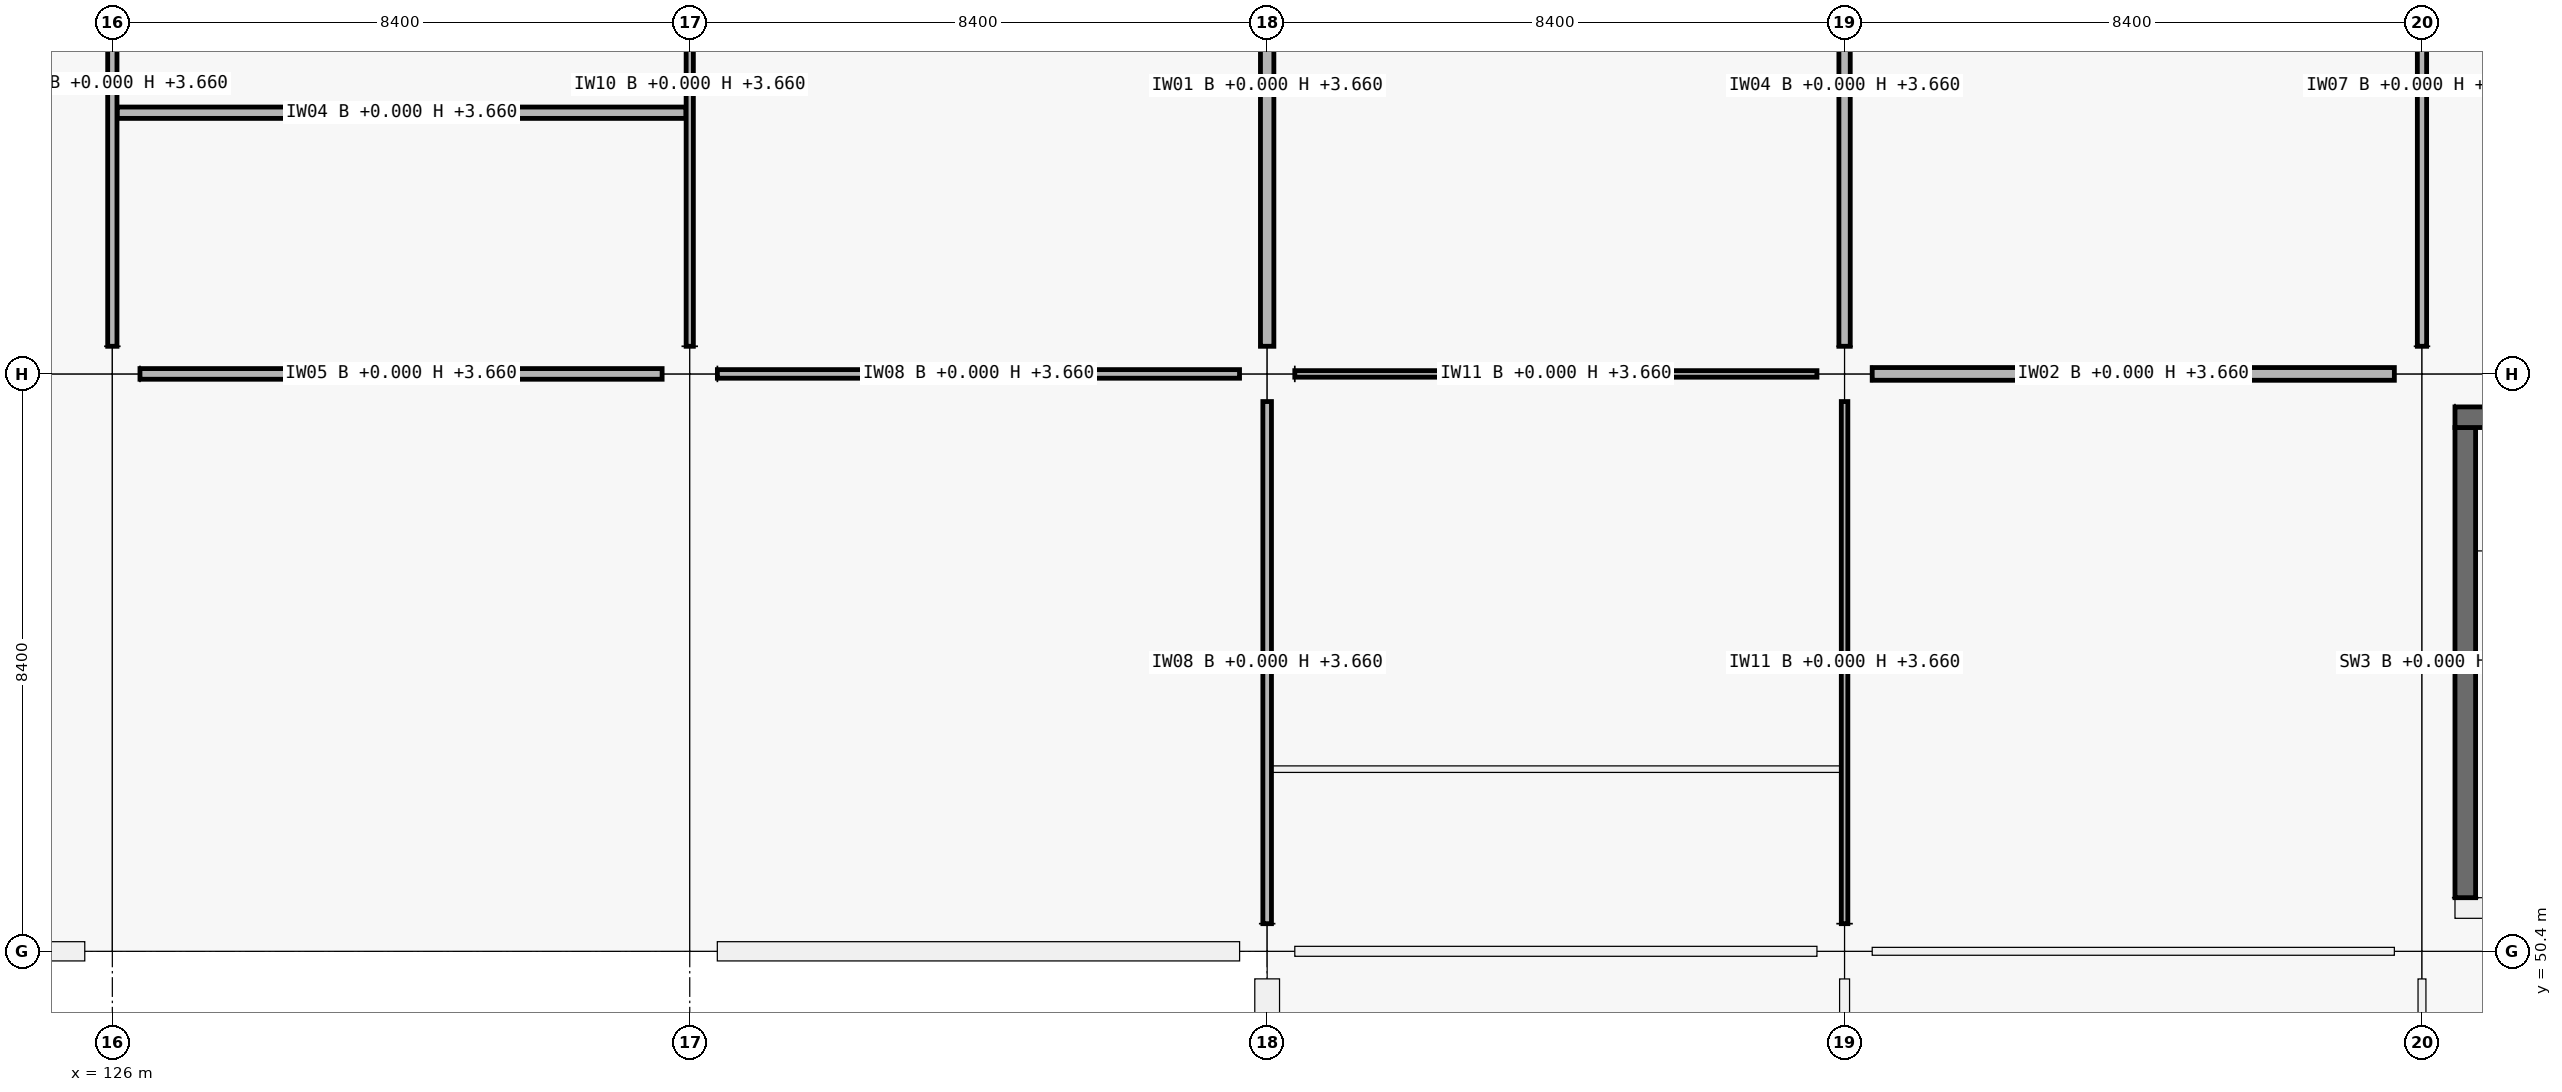
"""IFC4 building model, lengths in metres.
Left out: names, types, materials, properties, quantities, classifications, styles, units other than length and angle.
Written with IfcOpenShell. Run it as: python <this file> out.ifc"""

import sys

from ifc_helpers import new_model, si_unit, direction, frame, frame_2d, origin, origin_2d, place, context, subcontext, project, spatial, rectangle, extrude, element, fill, save


model = new_model("IFC4")
c1 = context("Model", 3, precision=1e-05, world=origin(), true_north=direction((0.0, 1.0)))
c2 = subcontext(c1, "Body", "Model", "MODEL_VIEW")
j1 = project(units=[si_unit("LENGTHUNIT", "METRE"), si_unit("PLANEANGLEUNIT", "RADIAN")], contexts=[c1])
p1 = place(None, origin())
s1 = spatial("IfcSite", under=j1, at=p1, CompositionType="ELEMENT")
p2 = place(p1, origin())
s2 = spatial("IfcBuilding", under=s1, at=p2, CompositionType="ELEMENT")
p3 = place(p2, origin())
s3 = spatial("IfcBuildingStorey", under=s2, at=p3, CompositionType="ELEMENT", Elevation=0.0)
for number, where, z_axis, x_axis in (
    (1, (126.0, 50.4, 0.0), (0.0, 0.0, 1.0), (1.0, 0.0, 0.0)),
    (2, (126.0, 58.8, 0.0), (0.0, 0.0, 1.0), (1.0, 0.0, 0.0)),
    (3, (134.4, 50.4, 0.0), (0.0, 0.0, 1.0), (1.0, 0.0, 0.0)),
    (4, (134.4, 58.8, 0.0), (0.0, 0.0, 1.0), (1.0, 0.0, 0.0)),
    (5, (142.8, 50.4, 0.0), (0.0, 0.0, 1.0), (1.0, 0.0, 0.0)),
    (6, (142.8, 58.8, 0.0), (0.0, 0.0, 1.0), (1.0, 0.0, 0.0)),
    (7, (151.2, 50.4, 0.0), (0.0, 0.0, 1.0), (1.0, 0.0, 0.0)),
    (8, (151.2, 58.8, 0.0), (0.0, 0.0, 1.0), (1.0, 0.0, 0.0)),
    (9, (159.6, 50.4, 0.0), (0.0, 0.0, 1.0), (1.0, 0.0, 0.0)),
    (10, (159.6, 58.8, 0.0), (0.0, 0.0, 1.0), (1.0, 0.0, 0.0)),
):
    element("IfcColumn", number, at=place(p3, frame(where, z_axis=z_axis, x_axis=x_axis)), inside=s3, PredefinedType="COLUMN", context=c2, shape_type="SweptSolid", body=[
        extrude(rectangle(XDim=0.8, YDim=0.8, at=origin_2d()), origin(), (0.0, 0.0, 1.0), 5.76),
    ])
p4 = place(p3, frame((125.599, 50.4, 0.0), z_axis=(0.0, 0.0, 1.0), x_axis=(-1.0, 0.0, 0.0)))
e11 = element("IfcWall", 11, at=p4, inside=s3, PredefinedType="SOLIDWALL", context=c2, shape_type="SweptSolid", body=[
    extrude(rectangle(XDim=7.598, YDim=0.28, at=frame_2d((3.799, 0.0))), origin(), (0.0, 0.0, 1.0), 4.7),
])
p5 = place(p4, frame((2.924, 0.0, 0.9)))
e12 = element("IfcOpeningElement", 12, at=p5, cuts=e11, PredefinedType="OPENING", context=c2, shape_type="SweptSolid", body=[
    extrude(rectangle(XDim=1.75, YDim=1.95, at=frame_2d((0.875, 0.975))), frame((0.0, 0.14, 0.0), z_axis=(0.0, -1.0, 0.0), x_axis=(1.0, 0.0, 0.0)), (0.0, 0.0, 1.0), 0.28),
])
p6 = place(p3, frame((142.399, 50.4, 0.0), z_axis=(0.0, 0.0, 1.0), x_axis=(-1.0, 0.0, 0.0)))
e13 = element("IfcWall", 13, at=p6, inside=s3, PredefinedType="SOLIDWALL", context=c2, shape_type="SweptSolid", body=[
    extrude(rectangle(XDim=7.598, YDim=0.28, at=frame_2d((3.799, 0.0))), origin(), (0.0, 0.0, 1.0), 4.7),
])
p7 = place(p3, frame((142.8, 42.401, 0.0), z_axis=(0.0, 0.0, 1.0), x_axis=(0.0, 1.0, 0.0)))
e14 = element("IfcWall", 14, at=p7, inside=s3, PredefinedType="SOLIDWALL", context=c2, shape_type="SweptSolid", body=[
    extrude(rectangle(XDim=7.598, YDim=0.36, at=frame_2d((3.799, 0.0))), origin(), (0.0, 0.0, 1.0), 4.7),
])
p8 = place(p7, frame((2.574, 0.0, 0.9)))
e15 = element("IfcOpeningElement", 15, at=p8, cuts=e14, PredefinedType="OPENING", context=c2, shape_type="SweptSolid", body=[
    extrude(rectangle(XDim=2.45, YDim=1.45, at=frame_2d((1.225, 0.725))), frame((0.0, 0.18, 0.0), z_axis=(0.0, -1.0, 0.0), x_axis=(1.0, 0.0, 0.0)), (0.0, 0.0, 1.0), 0.36),
])
p9 = place(p3, frame((167.52, 51.03, 0.0), z_axis=(0.0, 0.0, 1.0), x_axis=(-1.0, 0.0, 0.0)))
e16 = element("IfcWall", 16, at=p9, inside=s3, PredefinedType="SHEAR", context=c2, shape_type="SweptSolid", body=[
    extrude(rectangle(XDim=7.44, YDim=0.3, at=frame_2d((3.72, 0.0))), origin(), (0.0, 0.0, 1.0), 5.76),
])
p10 = place(p9, frame((1.28, 0.0, 0.0)))
e17 = element("IfcOpeningElement", 17, at=p10, cuts=e16, PredefinedType="OPENING", context=c2, shape_type="SweptSolid", body=[
    extrude(rectangle(XDim=1.5, YDim=2.15, at=frame_2d((0.75, 1.075))), frame((0.0, 0.15, 0.0), z_axis=(0.0, -1.0, 0.0), x_axis=(1.0, 0.0, 0.0)), (0.0, 0.0, 1.0), 0.3),
])
p11 = place(p3, frame((160.23, 51.18, 0.0), z_axis=(0.0, 0.0, 1.0), x_axis=(0.0, 1.0, 0.0)))
e18 = element("IfcWall", 18, at=p11, inside=s3, PredefinedType="SHEAR", context=c2, shape_type="SweptSolid", body=[
    extrude(rectangle(XDim=6.84, YDim=0.3, at=frame_2d((3.42, 0.0))), origin(), (0.0, 0.0, 1.0), 5.76),
])
p12 = place(p3, frame((160.08, 58.17, 0.0), z_axis=(0.0, 0.0, 1.0), x_axis=(1.0, 0.0, 0.0)))
e19 = element("IfcWall", 19, at=p12, inside=s3, PredefinedType="SHEAR", context=c2, shape_type="SweptSolid", body=[
    extrude(rectangle(XDim=7.44, YDim=0.3, at=frame_2d((3.72, 0.0))), origin(), (0.0, 0.0, 1.0), 5.76),
])
p13 = place(p3, frame((126.402, 58.8, 0.0), z_axis=(0.0, 0.0, 1.0), x_axis=(1.0, 0.0, 0.0)))
e20 = element("IfcWall", 20, at=p13, inside=s3, PredefinedType="PARTITIONING", context=c2, shape_type="SweptSolid", body=[
    extrude(rectangle(XDim=7.596, YDim=0.155, at=frame_2d((3.798, 0.0))), origin(), (0.0, 0.0, 1.0), 3.66),
])
p14 = place(p3, frame((134.802, 58.8, 0.0), z_axis=(0.0, 0.0, 1.0), x_axis=(1.0, 0.0, 0.0)))
e21 = element("IfcWall", 21, at=p14, inside=s3, PredefinedType="PARTITIONING", context=c2, shape_type="SweptSolid", body=[
    extrude(rectangle(XDim=7.596, YDim=0.125, at=frame_2d((3.798, 0.0))), origin(), (0.0, 0.0, 1.0), 3.66),
])
p15 = place(p14, frame((3.293, 0.0, 0.0)))
e22 = element("IfcOpeningElement", 22, at=p15, cuts=e21, PredefinedType="OPENING", context=c2, shape_type="SweptSolid", body=[
    extrude(rectangle(XDim=1.01, YDim=2.12, at=frame_2d((0.505, 1.06))), frame((0.0, 0.062, 0.0), z_axis=(0.0, -1.0, 0.0), x_axis=(1.0, 0.0, 0.0)), (0.0, 0.0, 1.0), 0.125),
])
p16 = place(p3, frame((143.202, 50.4, 0.0), z_axis=(0.0, 0.0, 1.0), x_axis=(1.0, 0.0, 0.0)))
e23 = element("IfcWall", 23, at=p16, inside=s3, PredefinedType="PARTITIONING", context=c2, shape_type="SweptSolid", body=[
    extrude(rectangle(XDim=7.596, YDim=0.145, at=frame_2d((3.798, 0.0))), origin(), (0.0, 0.0, 1.0), 3.66),
])
p17 = place(p3, frame((143.202, 58.8, 0.0), z_axis=(0.0, 0.0, 1.0), x_axis=(1.0, 0.0, 0.0)))
e24 = element("IfcWall", 24, at=p17, inside=s3, PredefinedType="PARTITIONING", context=c2, shape_type="SweptSolid", body=[
    extrude(rectangle(XDim=7.596, YDim=0.095, at=frame_2d((3.798, 0.0))), origin(), (0.0, 0.0, 1.0), 3.66),
])
p18 = place(p3, frame((151.602, 50.4, 0.0), z_axis=(0.0, 0.0, 1.0), x_axis=(1.0, 0.0, 0.0)))
e25 = element("IfcWall", 25, at=p18, inside=s3, PredefinedType="PARTITIONING", context=c2, shape_type="SweptSolid", body=[
    extrude(rectangle(XDim=7.596, YDim=0.115, at=frame_2d((3.798, 0.0))), origin(), (0.0, 0.0, 1.0), 3.66),
])
p19 = place(p18, frame((3.308, 0.0, 0.0)))
e26 = element("IfcOpeningElement", 26, at=p19, cuts=e25, PredefinedType="OPENING", context=c2, shape_type="SweptSolid", body=[
    extrude(rectangle(XDim=0.98, YDim=2.18, at=frame_2d((0.49, 1.09))), frame((0.0, 0.058, 0.0), z_axis=(0.0, -1.0, 0.0), x_axis=(1.0, 0.0, 0.0)), (0.0, 0.0, 1.0), 0.115),
])
p20 = place(p3, frame((151.602, 58.8, 0.0), z_axis=(0.0, 0.0, 1.0), x_axis=(1.0, 0.0, 0.0)))
e27 = element("IfcWall", 27, at=p20, inside=s3, PredefinedType="PARTITIONING", context=c2, shape_type="SweptSolid", body=[
    extrude(rectangle(XDim=7.596, YDim=0.185, at=frame_2d((3.798, 0.0))), origin(), (0.0, 0.0, 1.0), 3.66),
])
p21 = place(p20, frame((3.318, 0.0, 0.0)))
e28 = element("IfcOpeningElement", 28, at=p21, cuts=e27, PredefinedType="OPENING", context=c2, shape_type="SweptSolid", body=[
    extrude(rectangle(XDim=0.96, YDim=2.18, at=frame_2d((0.48, 1.09))), frame((0.0, 0.093, 0.0), z_axis=(0.0, -1.0, 0.0), x_axis=(1.0, 0.0, 0.0)), (0.0, 0.0, 1.0), 0.185),
])
p22 = place(p3, frame((126.0, 59.202, 0.0), z_axis=(0.0, 0.0, 1.0), x_axis=(0.0, 1.0, 0.0)))
e29 = element("IfcWall", 29, at=p22, inside=s3, PredefinedType="PARTITIONING", context=c2, shape_type="SweptSolid", body=[
    extrude(rectangle(XDim=7.646, YDim=0.135, at=frame_2d((3.823, 0.0))), origin(), (0.0, 0.0, 1.0), 3.66),
])
p23 = place(p22, frame((1.153, 0.0, 0.0)))
e30 = element("IfcOpeningElement", 30, at=p23, cuts=e29, PredefinedType="OPENING", context=c2, shape_type="SweptSolid", body=[
    extrude(rectangle(XDim=0.97, YDim=2.12, at=frame_2d((0.485, 1.06))), frame((0.0, 0.067, 0.0), z_axis=(0.0, -1.0, 0.0), x_axis=(1.0, 0.0, 0.0)), (0.0, 0.0, 1.0), 0.135),
])
p24 = place(p22, frame((5.093, 0.0, 0.0)))
e31 = element("IfcOpeningElement", 31, at=p24, cuts=e29, PredefinedType="OPENING", context=c2, shape_type="SweptSolid", body=[
    extrude(rectangle(XDim=0.93, YDim=2.12, at=frame_2d((0.465, 1.06))), frame((0.0, 0.067, 0.0), z_axis=(0.0, -1.0, 0.0), x_axis=(1.0, 0.0, 0.0)), (0.0, 0.0, 1.0), 0.135),
])
p25 = place(p3, frame((134.4, 59.202, 0.0), z_axis=(0.0, 0.0, 1.0), x_axis=(0.0, 1.0, 0.0)))
e32 = element("IfcWall", 32, at=p25, inside=s3, PredefinedType="PARTITIONING", context=c2, shape_type="SweptSolid", body=[
    extrude(rectangle(XDim=7.621, YDim=0.105, at=frame_2d((3.811, 0.0))), origin(), (0.0, 0.0, 1.0), 3.66),
])
p26 = place(p3, frame((142.8, 50.802, 0.0), z_axis=(0.0, 0.0, 1.0), x_axis=(0.0, 1.0, 0.0)))
e33 = element("IfcWall", 33, at=p26, inside=s3, PredefinedType="PARTITIONING", context=c2, shape_type="SweptSolid", body=[
    extrude(rectangle(XDim=7.596, YDim=0.125, at=frame_2d((3.798, 0.0))), origin(), (0.0, 0.0, 1.0), 3.66),
])
p27 = place(p26, frame((0.593, 0.0, 0.0)))
e34 = element("IfcOpeningElement", 34, at=p27, cuts=e33, PredefinedType="OPENING", context=c2, shape_type="SweptSolid", body=[
    extrude(rectangle(XDim=0.94, YDim=2.08, at=frame_2d((0.47, 1.04))), frame((0.0, 0.062, 0.0), z_axis=(0.0, -1.0, 0.0), x_axis=(1.0, 0.0, 0.0)), (0.0, 0.0, 1.0), 0.125),
])
p28 = place(p26, frame((4.503, 0.0, 0.0)))
e35 = element("IfcOpeningElement", 35, at=p28, cuts=e33, PredefinedType="OPENING", context=c2, shape_type="SweptSolid", body=[
    extrude(rectangle(XDim=0.96, YDim=2.1, at=frame_2d((0.48, 1.05))), frame((0.0, 0.062, 0.0), z_axis=(0.0, -1.0, 0.0), x_axis=(1.0, 0.0, 0.0)), (0.0, 0.0, 1.0), 0.125),
])
p29 = place(p3, frame((142.8, 59.202, 0.0), z_axis=(0.0, 0.0, 1.0), x_axis=(0.0, 1.0, 0.0)))
e36 = element("IfcWall", 36, at=p29, inside=s3, PredefinedType="PARTITIONING", context=c2, shape_type="SweptSolid", body=[
    extrude(rectangle(XDim=7.596, YDim=0.195, at=frame_2d((3.798, 0.0))), origin(), (0.0, 0.0, 1.0), 3.66),
])
p30 = place(p29, frame((3.268, 0.0, 0.0)))
e37 = element("IfcOpeningElement", 37, at=p30, cuts=e36, PredefinedType="OPENING", context=c2, shape_type="SweptSolid", body=[
    extrude(rectangle(XDim=1.06, YDim=2.25, at=frame_2d((0.53, 1.125))), frame((0.0, 0.098, 0.0), z_axis=(0.0, -1.0, 0.0), x_axis=(1.0, 0.0, 0.0)), (0.0, 0.0, 1.0), 0.195),
])
p31 = place(p3, frame((151.2, 42.352, 0.0), z_axis=(0.0, 0.0, 1.0), x_axis=(0.0, 1.0, 0.0)))
e38 = element("IfcWall", 38, at=p31, inside=s3, PredefinedType="PARTITIONING", context=c2, shape_type="SweptSolid", body=[
    extrude(rectangle(XDim=7.646, YDim=0.145, at=frame_2d((3.823, 0.0))), origin(), (0.0, 0.0, 1.0), 3.66),
])
p32 = place(p31, frame((3.333, 0.0, 0.0)))
e39 = element("IfcOpeningElement", 39, at=p32, cuts=e38, PredefinedType="OPENING", context=c2, shape_type="SweptSolid", body=[
    extrude(rectangle(XDim=0.98, YDim=2.18, at=frame_2d((0.49, 1.09))), frame((0.0, 0.073, 0.0), z_axis=(0.0, -1.0, 0.0), x_axis=(1.0, 0.0, 0.0)), (0.0, 0.0, 1.0), 0.145),
])
p33 = place(p3, frame((151.2, 50.802, 0.0), z_axis=(0.0, 0.0, 1.0), x_axis=(0.0, 1.0, 0.0)))
e40 = element("IfcWall", 40, at=p33, inside=s3, PredefinedType="PARTITIONING", context=c2, shape_type="SweptSolid", body=[
    extrude(rectangle(XDim=7.596, YDim=0.095, at=frame_2d((3.798, 0.0))), origin(), (0.0, 0.0, 1.0), 3.66),
])
p34 = place(p3, frame((151.2, 59.202, 0.0), z_axis=(0.0, 0.0, 1.0), x_axis=(0.0, 1.0, 0.0)))
e41 = element("IfcWall", 41, at=p34, inside=s3, PredefinedType="PARTITIONING", context=c2, shape_type="SweptSolid", body=[
    extrude(rectangle(XDim=7.596, YDim=0.165, at=frame_2d((3.798, 0.0))), origin(), (0.0, 0.0, 1.0), 3.66),
])
p35 = place(p34, frame((3.318, 0.0, 0.0)))
e42 = element("IfcOpeningElement", 42, at=p35, cuts=e41, PredefinedType="OPENING", context=c2, shape_type="SweptSolid", body=[
    extrude(rectangle(XDim=0.96, YDim=2.18, at=frame_2d((0.48, 1.09))), frame((0.0, 0.083, 0.0), z_axis=(0.0, -1.0, 0.0), x_axis=(1.0, 0.0, 0.0)), (0.0, 0.0, 1.0), 0.165),
])
p36 = place(p3, frame((159.6, 42.402, 0.0), z_axis=(0.0, 0.0, 1.0), x_axis=(0.0, 1.0, 0.0)))
e43 = element("IfcWall", 43, at=p36, inside=s3, PredefinedType="PARTITIONING", context=c2, shape_type="SweptSolid", body=[
    extrude(rectangle(XDim=7.596, YDim=0.115, at=frame_2d((3.798, 0.0))), origin(), (0.0, 0.0, 1.0), 3.66),
])
p37 = place(p36, frame((3.338, 0.0, 0.0)))
e44 = element("IfcOpeningElement", 44, at=p37, cuts=e43, PredefinedType="OPENING", context=c2, shape_type="SweptSolid", body=[
    extrude(rectangle(XDim=0.92, YDim=2.15, at=frame_2d((0.46, 1.075))), frame((0.0, 0.058, 0.0), z_axis=(0.0, -1.0, 0.0), x_axis=(1.0, 0.0, 0.0)), (0.0, 0.0, 1.0), 0.115),
])
p38 = place(p3, frame((159.6, 59.202, 0.0), z_axis=(0.0, 0.0, 1.0), x_axis=(0.0, 1.0, 0.0)))
e45 = element("IfcWall", 45, at=p38, inside=s3, PredefinedType="PARTITIONING", context=c2, shape_type="SweptSolid", body=[
    extrude(rectangle(XDim=7.596, YDim=0.135, at=frame_2d((3.798, 0.0))), origin(), (0.0, 0.0, 1.0), 3.66),
])
p39 = place(p38, frame((3.288, 0.0, 0.0)))
e46 = element("IfcOpeningElement", 46, at=p39, cuts=e45, PredefinedType="OPENING", context=c2, shape_type="SweptSolid", body=[
    extrude(rectangle(XDim=1.02, YDim=2.2, at=frame_2d((0.51, 1.1))), frame((0.0, 0.067, 0.0), z_axis=(0.0, -1.0, 0.0), x_axis=(1.0, 0.0, 0.0)), (0.0, 0.0, 1.0), 0.135),
])
p40 = place(p3, frame((126.07, 62.6, 0.0), z_axis=(0.0, 0.0, 1.0), x_axis=(1.0, 0.0, 0.0)))
e47 = element("IfcWall", 47, at=p40, inside=s3, PredefinedType="PARTITIONING", context=c2, shape_type="SweptSolid", body=[
    extrude(rectangle(XDim=8.276, YDim=0.165, at=frame_2d((4.138, 0.0))), origin(), (0.0, 0.0, 1.0), 3.66),
])
p41 = place(p3, frame((142.865, 53.05, 0.0), z_axis=(0.0, 0.0, 1.0), x_axis=(1.0, 0.0, 0.0)))
e48 = element("IfcWall", 48, at=p41, inside=s3, PredefinedType="PARTITIONING", context=c2, shape_type="SweptSolid", body=[
    extrude(rectangle(XDim=8.286, YDim=0.095, at=frame_2d((4.143, 0.0))), origin(), (0.0, 0.0, 1.0), 3.66),
])
p42 = place(p23, origin())
e49 = element("IfcDoor", 49, at=p42, inside=s3, OperationType="SINGLE_SWING_LEFT", PredefinedType="DOOR", context=c2, shape_type="SweptSolid", body=[
    extrude(rectangle(XDim=0.97, YDim=2.12, at=frame_2d((0.485, 1.06))), frame((0.0, 0.025, 0.0), z_axis=(0.0, -1.0, 0.0), x_axis=(1.0, 0.0, 0.0)), (0.0, 0.0, 1.0), 0.05),
])
fill(e30, e49)
p43 = place(p27, origin())
e50 = element("IfcDoor", 50, at=p43, inside=s3, OperationType="SINGLE_SWING_LEFT", PredefinedType="DOOR", context=c2, shape_type="SweptSolid", body=[
    extrude(rectangle(XDim=0.94, YDim=2.08, at=frame_2d((0.47, 1.04))), frame((0.0, 0.025, 0.0), z_axis=(0.0, -1.0, 0.0), x_axis=(1.0, 0.0, 0.0)), (0.0, 0.0, 1.0), 0.05),
])
fill(e34, e50)
p44 = place(p28, origin())
e51 = element("IfcDoor", 51, at=p44, inside=s3, OperationType="SINGLE_SWING_RIGHT", PredefinedType="DOOR", context=c2, shape_type="SweptSolid", body=[
    extrude(rectangle(XDim=0.96, YDim=2.1, at=frame_2d((0.48, 1.05))), frame((0.0, 0.025, 0.0), z_axis=(0.0, -1.0, 0.0), x_axis=(1.0, 0.0, 0.0)), (0.0, 0.0, 1.0), 0.05),
])
fill(e35, e51)
p45 = place(p15, origin())
e52 = element("IfcDoor", 52, at=p45, inside=s3, OperationType="SINGLE_SWING_LEFT", PredefinedType="DOOR", context=c2, shape_type="SweptSolid", body=[
    extrude(rectangle(XDim=1.01, YDim=2.12, at=frame_2d((0.505, 1.06))), frame((0.0, 0.025, 0.0), z_axis=(0.0, -1.0, 0.0), x_axis=(1.0, 0.0, 0.0)), (0.0, 0.0, 1.0), 0.05),
])
fill(e22, e52)
p46 = place(p19, origin())
e53 = element("IfcDoor", 53, at=p46, inside=s3, OperationType="SINGLE_SWING_RIGHT", PredefinedType="DOOR", context=c2, shape_type="SweptSolid", body=[
    extrude(rectangle(XDim=0.98, YDim=2.18, at=frame_2d((0.49, 1.09))), frame((0.0, 0.025, 0.0), z_axis=(0.0, -1.0, 0.0), x_axis=(1.0, 0.0, 0.0)), (0.0, 0.0, 1.0), 0.05),
])
fill(e26, e53)
p47 = place(p21, origin())
e54 = element("IfcDoor", 54, at=p47, inside=s3, OperationType="SINGLE_SWING_LEFT", PredefinedType="DOOR", context=c2, shape_type="SweptSolid", body=[
    extrude(rectangle(XDim=0.96, YDim=2.18, at=frame_2d((0.48, 1.09))), frame((0.0, 0.025, 0.0), z_axis=(0.0, -1.0, 0.0), x_axis=(1.0, 0.0, 0.0)), (0.0, 0.0, 1.0), 0.05),
])
fill(e28, e54)
p48 = place(p30, origin())
e55 = element("IfcDoor", 55, at=p48, inside=s3, OperationType="SINGLE_SWING_LEFT", PredefinedType="DOOR", context=c2, shape_type="SweptSolid", body=[
    extrude(rectangle(XDim=1.06, YDim=2.25, at=frame_2d((0.53, 1.125))), frame((0.0, 0.025, 0.0), z_axis=(0.0, -1.0, 0.0), x_axis=(1.0, 0.0, 0.0)), (0.0, 0.0, 1.0), 0.05),
])
fill(e37, e55)
p49 = place(p39, origin())
e56 = element("IfcDoor", 56, at=p49, inside=s3, OperationType="SINGLE_SWING_LEFT", PredefinedType="DOOR", context=c2, shape_type="SweptSolid", body=[
    extrude(rectangle(XDim=1.02, YDim=2.2, at=frame_2d((0.51, 1.1))), frame((0.0, 0.025, 0.0), z_axis=(0.0, -1.0, 0.0), x_axis=(1.0, 0.0, 0.0)), (0.0, 0.0, 1.0), 0.05),
])
fill(e46, e56)
p50 = place(p35, origin())
e57 = element("IfcDoor", 57, at=p50, inside=s3, OperationType="SINGLE_SWING_RIGHT", PredefinedType="DOOR", context=c2, shape_type="SweptSolid", body=[
    extrude(rectangle(XDim=0.96, YDim=2.18, at=frame_2d((0.48, 1.09))), frame((0.0, 0.025, 0.0), z_axis=(0.0, -1.0, 0.0), x_axis=(1.0, 0.0, 0.0)), (0.0, 0.0, 1.0), 0.05),
])
fill(e42, e57)
save(model, sys.argv[1])
